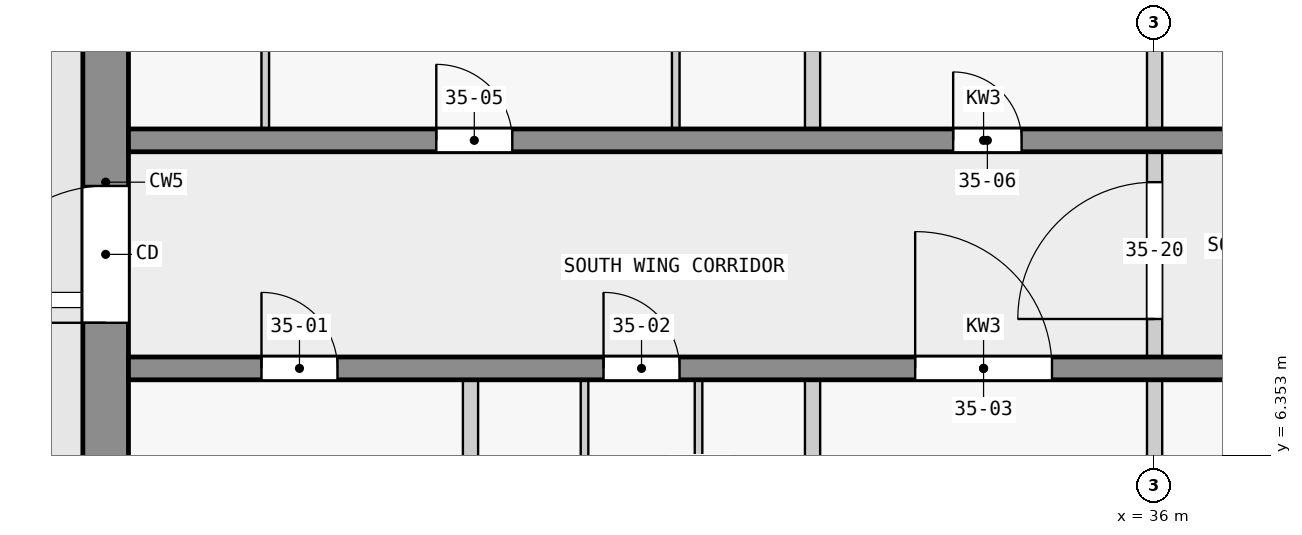
"""IFC4 building model, lengths in metres.
Left out: names, types, materials, properties, quantities, classifications, styles, units other than length and angle.
Written with IfcOpenShell. Run it as: python <this file> out.ifc"""

import sys

from ifc_helpers import new_model, si_unit, direction, frame, frame_2d, origin, place, context, subcontext, project, spatial, rectangle, extrude, element, fill, save


model = new_model("IFC4")
c1 = context("Model", 3, precision=1e-05, world=origin(), true_north=direction((0.0, 1.0)))
c2 = subcontext(c1, "Body", "Model", "MODEL_VIEW")
j1 = project(units=[si_unit("LENGTHUNIT", "METRE"), si_unit("PLANEANGLEUNIT", "RADIAN")], contexts=[c1])
p1 = place(None, origin())
s1 = spatial("IfcSite", under=j1, at=p1, CompositionType="ELEMENT")
p2 = place(p1, origin())
s2 = spatial("IfcBuilding", under=s1, at=p2, CompositionType="ELEMENT")
p3 = place(p2, frame((0.0, 0.0, 139.4)))
s3 = spatial("IfcBuildingStorey", under=s2, at=p3, CompositionType="ELEMENT", Elevation=139.4)
p4 = place(p3, frame((22.2, 2.5, 0.0), z_axis=(0.0, 0.0, 1.0), x_axis=(0.0, 1.0, 0.0)))
e1 = element("IfcWall", 1, at=p4, inside=s3, PredefinedType="SHEAR", context=c2, shape_type="SweptSolid", body=[
    extrude(rectangle(XDim=14.9, YDim=0.6, at=frame_2d((7.45, 0.0))), origin(), (0.0, 0.0, 1.0), 3.25),
])
p5 = place(p4, frame((5.6, 0.0, 0.0)))
e2 = element("IfcOpeningElement", 2, at=p5, cuts=e1, PredefinedType="OPENING", context=c2, shape_type="SweptSolid", body=[
    extrude(rectangle(XDim=1.8, YDim=2.1, at=frame_2d((0.9, 1.05))), frame((0.0, 0.31, 0.0), z_axis=(0.0, -1.0, 0.0), x_axis=(1.0, 0.0, 0.0)), (0.0, 0.0, 1.0), 0.62),
])
p6 = place(p3, frame((22.5, 7.5, 0.0), z_axis=(0.0, 0.0, 1.0), x_axis=(1.0, 0.0, 0.0)))
e3 = element("IfcWall", 3, at=p6, inside=s3, PredefinedType="SHEAR", context=c2, shape_type="SweptSolid", body=[
    extrude(rectangle(XDim=22.5, YDim=0.3, at=frame_2d((11.25, 0.0))), origin(), (0.0, 0.0, 1.0), 3.25),
])
p7 = place(p6, frame((1.75, 0.0, 0.0)))
e4 = element("IfcOpeningElement", 4, at=p7, cuts=e3, PredefinedType="OPENING", context=c2, shape_type="SweptSolid", body=[
    extrude(rectangle(XDim=1.0, YDim=2.1, at=frame_2d((0.5, 1.05))), frame((0.0, 0.16, 0.0), z_axis=(0.0, -1.0, 0.0), x_axis=(1.0, 0.0, 0.0)), (0.0, 0.0, 1.0), 0.32),
])
p8 = place(p6, frame((6.25, 0.0, 0.0)))
e5 = element("IfcOpeningElement", 5, at=p8, cuts=e3, PredefinedType="OPENING", context=c2, shape_type="SweptSolid", body=[
    extrude(rectangle(XDim=1.0, YDim=2.1, at=frame_2d((0.5, 1.05))), frame((0.0, 0.16, 0.0), z_axis=(0.0, -1.0, 0.0), x_axis=(1.0, 0.0, 0.0)), (0.0, 0.0, 1.0), 0.32),
])
p9 = place(p6, frame((10.35, 0.0, 0.0)))
e6 = element("IfcOpeningElement", 6, at=p9, cuts=e3, PredefinedType="OPENING", context=c2, shape_type="SweptSolid", body=[
    extrude(rectangle(XDim=1.8, YDim=2.1, at=frame_2d((0.9, 1.05))), frame((0.0, 0.16, 0.0), z_axis=(0.0, -1.0, 0.0), x_axis=(1.0, 0.0, 0.0)), (0.0, 0.0, 1.0), 0.32),
])
p10 = place(p6, frame((16.85, 0.0, 0.0)))
e7 = element("IfcOpeningElement", 7, at=p10, cuts=e3, PredefinedType="OPENING", context=c2, shape_type="SweptSolid", body=[
    extrude(rectangle(XDim=1.0, YDim=2.1, at=frame_2d((0.5, 1.05))), frame((0.0, 0.16, 0.0), z_axis=(0.0, -1.0, 0.0), x_axis=(1.0, 0.0, 0.0)), (0.0, 0.0, 1.0), 0.32),
])
p11 = place(p3, frame((22.5, 10.5, 0.0), z_axis=(0.0, 0.0, 1.0), x_axis=(1.0, 0.0, 0.0)))
e8 = element("IfcWall", 8, at=p11, inside=s3, PredefinedType="SHEAR", context=c2, shape_type="SweptSolid", body=[
    extrude(rectangle(XDim=22.5, YDim=0.3, at=frame_2d((11.25, 0.0))), origin(), (0.0, 0.0, 1.0), 3.25),
])
p12 = place(p11, frame((4.05, 0.0, 0.0)))
e9 = element("IfcOpeningElement", 9, at=p12, cuts=e8, PredefinedType="OPENING", context=c2, shape_type="SweptSolid", body=[
    extrude(rectangle(XDim=1.0, YDim=2.1, at=frame_2d((0.5, 1.05))), frame((0.0, 0.16, 0.0), z_axis=(0.0, -1.0, 0.0), x_axis=(1.0, 0.0, 0.0)), (0.0, 0.0, 1.0), 0.32),
])
p13 = place(p11, frame((10.85, 0.0, 0.0)))
e10 = element("IfcOpeningElement", 10, at=p13, cuts=e8, PredefinedType="OPENING", context=c2, shape_type="SweptSolid", body=[
    extrude(rectangle(XDim=0.9, YDim=2.1, at=frame_2d((0.45, 1.05))), frame((0.0, 0.16, 0.0), z_axis=(0.0, -1.0, 0.0), x_axis=(1.0, 0.0, 0.0)), (0.0, 0.0, 1.0), 0.32),
])
p14 = place(p11, frame((15.25, 0.0, 0.0)))
e11 = element("IfcOpeningElement", 11, at=p14, cuts=e8, PredefinedType="OPENING", context=c2, shape_type="SweptSolid", body=[
    extrude(rectangle(XDim=1.0, YDim=2.1, at=frame_2d((0.5, 1.05))), frame((0.0, 0.16, 0.0), z_axis=(0.0, -1.0, 0.0), x_axis=(1.0, 0.0, 0.0)), (0.0, 0.0, 1.0), 0.32),
])
p15 = place(p11, frame((18.75, 0.0, 0.0)))
e12 = element("IfcOpeningElement", 12, at=p15, cuts=e8, PredefinedType="OPENING", context=c2, shape_type="SweptSolid", body=[
    extrude(rectangle(XDim=0.9, YDim=2.1, at=frame_2d((0.45, 1.05))), frame((0.0, 0.16, 0.0), z_axis=(0.0, -1.0, 0.0), x_axis=(1.0, 0.0, 0.0)), (0.0, 0.0, 1.0), 0.32),
])
p16 = place(p11, frame((20.95, 0.0, 0.0)))
e13 = element("IfcOpeningElement", 13, at=p16, cuts=e8, PredefinedType="OPENING", context=c2, shape_type="SweptSolid", body=[
    extrude(rectangle(XDim=1.0, YDim=2.1, at=frame_2d((0.5, 1.05))), frame((0.0, 0.16, 0.0), z_axis=(0.0, -1.0, 0.0), x_axis=(1.0, 0.0, 0.0)), (0.0, 0.0, 1.0), 0.32),
])
p17 = place(p3, frame((24.3, 10.65, 0.0), z_axis=(0.0, 0.0, 1.0), x_axis=(0.0, 1.0, 0.0)))
e14 = element("IfcWall", 14, at=p17, inside=s3, PredefinedType="PARTITIONING", context=c2, shape_type="SweptSolid", body=[
    extrude(rectangle(XDim=3.4, YDim=0.1, at=frame_2d((1.7, 0.0))), origin(), (0.0, 0.0, 1.0), 3.25),
])
p18 = place(p17, frame((1.25, 0.0, 0.0)))
e15 = element("IfcOpeningElement", 15, at=p18, cuts=e14, PredefinedType="OPENING", context=c2, shape_type="SweptSolid", body=[
    extrude(rectangle(XDim=0.9, YDim=2.1, at=frame_2d((0.45, 1.05))), frame((0.0, 0.06, 0.0), z_axis=(0.0, -1.0, 0.0), x_axis=(1.0, 0.0, 0.0)), (0.0, 0.0, 1.0), 0.12),
])
p19 = place(p3, frame((27.0, 1.527, 0.0), z_axis=(0.0, 0.0, 1.0), x_axis=(0.0, 1.0, 0.0)))
e16 = element("IfcWall", 16, at=p19, inside=s3, PredefinedType="PARTITIONING", context=c2, shape_type="SweptSolid", body=[
    extrude(rectangle(XDim=5.823, YDim=0.2, at=frame_2d((2.912, 0.0))), origin(), (0.0, 0.0, 1.0), 3.25),
])
p20 = place(p3, frame((28.5, 3.95, 0.0), z_axis=(0.0, 0.0, 1.0), x_axis=(0.0, 1.0, 0.0)))
e17 = element("IfcWall", 17, at=p20, inside=s3, PredefinedType="PARTITIONING", context=c2, shape_type="SweptSolid", body=[
    extrude(rectangle(XDim=3.4, YDim=0.1, at=frame_2d((1.7, 0.0))), origin(), (0.0, 0.0, 1.0), 3.25),
])
p21 = place(p20, frame((1.25, 0.0, 0.0)))
e18 = element("IfcOpeningElement", 18, at=p21, cuts=e17, PredefinedType="OPENING", context=c2, shape_type="SweptSolid", body=[
    extrude(rectangle(XDim=0.9, YDim=2.1, at=frame_2d((0.45, 1.05))), frame((0.0, 0.06, 0.0), z_axis=(0.0, -1.0, 0.0), x_axis=(1.0, 0.0, 0.0)), (0.0, 0.0, 1.0), 0.12),
])
p22 = place(p3, frame((29.7, 14.05, 0.0), z_axis=(0.0, 0.0, 1.0), x_axis=(0.0, -1.0, 0.0)))
e19 = element("IfcWall", 19, at=p22, inside=s3, PredefinedType="PARTITIONING", context=c2, shape_type="SweptSolid", body=[
    extrude(rectangle(XDim=3.4, YDim=0.1, at=frame_2d((1.7, 0.0))), origin(), (0.0, 0.0, 1.0), 3.25),
])
p23 = place(p22, frame((1.25, 0.0, 0.0)))
e20 = element("IfcOpeningElement", 20, at=p23, cuts=e19, PredefinedType="OPENING", context=c2, shape_type="SweptSolid", body=[
    extrude(rectangle(XDim=0.9, YDim=2.1, at=frame_2d((0.45, 1.05))), frame((0.0, 0.06, 0.0), z_axis=(0.0, -1.0, 0.0), x_axis=(1.0, 0.0, 0.0)), (0.0, 0.0, 1.0), 0.12),
])
p24 = place(p3, frame((30.0, 7.35, 0.0), z_axis=(0.0, 0.0, 1.0), x_axis=(0.0, -1.0, 0.0)))
e21 = element("IfcWall", 21, at=p24, inside=s3, PredefinedType="PARTITIONING", context=c2, shape_type="SweptSolid", body=[
    extrude(rectangle(XDim=3.4, YDim=0.1, at=frame_2d((1.7, 0.0))), origin(), (0.0, 0.0, 1.0), 3.25),
])
p25 = place(p24, frame((1.25, 0.0, 0.0)))
e22 = element("IfcOpeningElement", 22, at=p25, cuts=e21, PredefinedType="OPENING", context=c2, shape_type="SweptSolid", body=[
    extrude(rectangle(XDim=0.9, YDim=2.1, at=frame_2d((0.45, 1.05))), frame((0.0, 0.06, 0.0), z_axis=(0.0, -1.0, 0.0), x_axis=(1.0, 0.0, 0.0)), (0.0, 0.0, 1.0), 0.12),
])
for number, where, z_axis, x_axis in (
    (23, (31.5, 3.95, 0.0), (0.0, 0.0, 1.0), (0.0, 1.0, 0.0)),
    (24, (31.5, 10.65, 0.0), (0.0, 0.0, 1.0), (0.0, 1.0, 0.0)),
):
    element("IfcWall", number, at=place(p3, frame(where, z_axis=z_axis, x_axis=x_axis)), inside=s3, PredefinedType="PARTITIONING", context=c2, shape_type="SweptSolid", body=[
        extrude(rectangle(XDim=3.4, YDim=0.2, at=frame_2d((1.7, 0.0))), origin(), (0.0, 0.0, 1.0), 3.25),
    ])
for number, where, z_axis, x_axis in (
    (25, (36.0, 1.4, 0.0), (0.0, 0.0, 1.0), (0.0, 1.0, 0.0)),
    (26, (36.0, 10.65, 0.0), (0.0, 0.0, 1.0), (0.0, 1.0, 0.0)),
):
    element("IfcWall", number, at=place(p3, frame(where, z_axis=z_axis, x_axis=x_axis)), inside=s3, PredefinedType="PARTITIONING", context=c2, shape_type="SweptSolid", body=[
        extrude(rectangle(XDim=5.95, YDim=0.2, at=frame_2d((2.975, 0.0))), origin(), (0.0, 0.0, 1.0), 3.25),
    ])
p26 = place(p3, frame((36.0, 7.45, 0.0), z_axis=(0.0, 0.0, 1.0), x_axis=(0.0, 1.0, 0.0)))
e27 = element("IfcWall", 27, at=p26, inside=s3, PredefinedType="PARTITIONING", context=c2, shape_type="SweptSolid", body=[
    extrude(rectangle(XDim=3.1, YDim=0.2, at=frame_2d((1.55, 0.0))), origin(), (0.0, 0.0, 1.0), 3.25),
])
p27 = place(p26, frame((0.7, 0.0, 0.0)))
e28 = element("IfcOpeningElement", 28, at=p27, cuts=e27, PredefinedType="OPENING", context=c2, shape_type="SweptSolid", body=[
    extrude(rectangle(XDim=1.8, YDim=2.1, at=frame_2d((0.9, 1.05))), frame((0.0, 0.11, 0.0), z_axis=(0.0, -1.0, 0.0), x_axis=(1.0, 0.0, 0.0)), (0.0, 0.0, 1.0), 0.22),
])
p28 = place(p5, origin())
e29 = element("IfcDoor", 29, at=p28, inside=s3, OperationType="DOUBLE_DOOR_SINGLE_SWING", PredefinedType="DOOR", context=c2, shape_type="SweptSolid", body=[
    extrude(rectangle(XDim=1.8, YDim=2.1, at=frame_2d((0.9, 1.05))), frame((0.0, 0.025, 0.0), z_axis=(0.0, -1.0, 0.0), x_axis=(1.0, 0.0, 0.0)), (0.0, 0.0, 1.0), 0.05),
])
fill(e2, e29)
p29 = place(p7, origin())
e30 = element("IfcDoor", 30, at=p29, inside=s3, OperationType="SINGLE_SWING_LEFT", PredefinedType="DOOR", context=c2, shape_type="SweptSolid", body=[
    extrude(rectangle(XDim=1.0, YDim=2.1, at=frame_2d((0.5, 1.05))), frame((0.0, 0.025, 0.0), z_axis=(0.0, -1.0, 0.0), x_axis=(1.0, 0.0, 0.0)), (0.0, 0.0, 1.0), 0.05),
])
fill(e4, e30)
p30 = place(p8, origin())
e31 = element("IfcDoor", 31, at=p30, inside=s3, OperationType="SINGLE_SWING_LEFT", PredefinedType="DOOR", context=c2, shape_type="SweptSolid", body=[
    extrude(rectangle(XDim=1.0, YDim=2.1, at=frame_2d((0.5, 1.05))), frame((0.0, 0.025, 0.0), z_axis=(0.0, -1.0, 0.0), x_axis=(1.0, 0.0, 0.0)), (0.0, 0.0, 1.0), 0.05),
])
fill(e5, e31)
p31 = place(p9, origin())
e32 = element("IfcDoor", 32, at=p31, inside=s3, OperationType="SINGLE_SWING_LEFT", PredefinedType="DOOR", context=c2, shape_type="SweptSolid", body=[
    extrude(rectangle(XDim=1.8, YDim=2.1, at=frame_2d((0.9, 1.05))), frame((0.0, 0.025, 0.0), z_axis=(0.0, -1.0, 0.0), x_axis=(1.0, 0.0, 0.0)), (0.0, 0.0, 1.0), 0.05),
])
fill(e6, e32)
p32 = place(p12, origin())
e33 = element("IfcDoor", 33, at=p32, inside=s3, OperationType="SINGLE_SWING_LEFT", PredefinedType="DOOR", context=c2, shape_type="SweptSolid", body=[
    extrude(rectangle(XDim=1.0, YDim=2.1, at=frame_2d((0.5, 1.05))), frame((0.0, 0.025, 0.0), z_axis=(0.0, -1.0, 0.0), x_axis=(1.0, 0.0, 0.0)), (0.0, 0.0, 1.0), 0.05),
])
fill(e9, e33)
p33 = place(p13, origin())
e34 = element("IfcDoor", 34, at=p33, inside=s3, OperationType="SINGLE_SWING_RIGHT", PredefinedType="DOOR", context=c2, shape_type="SweptSolid", body=[
    extrude(rectangle(XDim=0.9, YDim=2.1, at=frame_2d((0.45, 1.05))), frame((0.0, 0.025, 0.0), z_axis=(0.0, -1.0, 0.0), x_axis=(1.0, 0.0, 0.0)), (0.0, 0.0, 1.0), 0.05),
])
fill(e10, e34)
p34 = place(p27, origin())
e35 = element("IfcDoor", 35, at=p34, inside=s3, OperationType="SINGLE_SWING_RIGHT", PredefinedType="DOOR", context=c2, shape_type="SweptSolid", body=[
    extrude(rectangle(XDim=1.8, YDim=2.1, at=frame_2d((0.9, 1.05))), frame((0.0, 0.025, 0.0), z_axis=(0.0, -1.0, 0.0), x_axis=(1.0, 0.0, 0.0)), (0.0, 0.0, 1.0), 0.05),
])
fill(e28, e35)
save(model, sys.argv[1])
